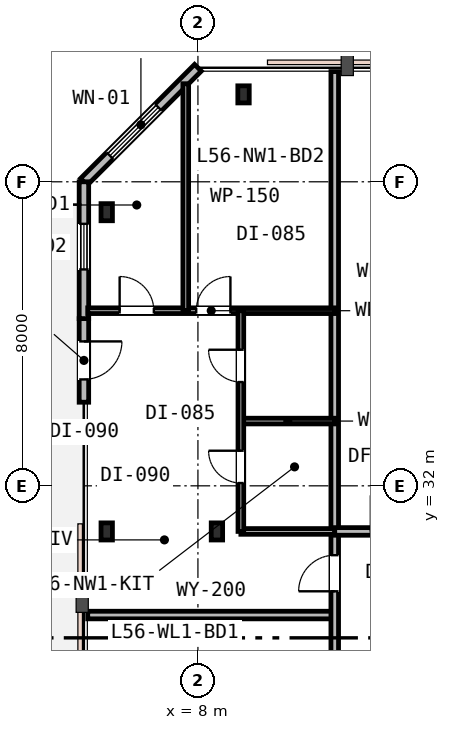
"""IFC4 building model, lengths in metres.
Left out: names, types, materials, properties, quantities, classifications, styles, units other than length and angle.
Written with IfcOpenShell. Run it as: python <this file> out.ifc"""

import sys

from ifc_helpers import new_model, si_unit, direction, frame, frame_2d, origin, origin_2d, place, context, subcontext, project, spatial, rectangle, i_section, extrude, element, fill, save


model = new_model("IFC4")
c1 = context("Model", 3, precision=1e-05, world=origin(), true_north=direction((0.0, 1.0)))
c2 = subcontext(c1, "Body", "Model", "MODEL_VIEW")
j1 = project(units=[si_unit("LENGTHUNIT", "METRE"), si_unit("PLANEANGLEUNIT", "RADIAN")], contexts=[c1])
p1 = place(None, origin())
s1 = spatial("IfcSite", under=j1, at=p1, CompositionType="ELEMENT")
p2 = place(p1, origin())
s2 = spatial("IfcBuilding", under=s1, at=p2, CompositionType="ELEMENT")
p3 = place(p2, frame((0.0, 0.0, 218.4)))
s3 = spatial("IfcBuildingStorey", under=s2, at=p3, CompositionType="ELEMENT", Elevation=218.4)
for number, where, z_axis, x_axis in (
    (1, (5.6, 30.8, 0.0), (0.0, 0.0, 1.0), (1.0, 0.0, 0.0)),
    (2, (5.6, 39.2, 0.0), (0.0, 0.0, 1.0), (1.0, 0.0, 0.0)),
    (3, (8.5, 30.8, 0.0), (0.0, 0.0, 1.0), (1.0, 0.0, 0.0)),
    (4, (9.2, 42.3, 0.0), (0.0, 0.0, 1.0), (1.0, 0.0, 0.0)),
):
    element("IfcColumn", number, at=place(p3, frame(where, z_axis=z_axis, x_axis=x_axis)), inside=s3, PredefinedType="COLUMN", context=c2, shape_type="SweptSolid", body=[
        extrude(i_section(OverallWidth=0.3, OverallDepth=0.45, WebThickness=0.014, FlangeThickness=0.026, FilletRadius=0.027, at=origin_2d()), origin(), (0.0, 0.0, 1.0), 3.8),
    ])
p4 = place(p3, frame((8.0, 43.0, 0.0), z_axis=(0.0, 0.0, 1.0), x_axis=(-0.707106781187, -0.707106781187, 0.0)))
e5 = element("IfcWall", 5, at=p4, inside=s3, PredefinedType="STANDARD", context=c2, shape_type="SweptSolid", body=[
    extrude(rectangle(XDim=4.243, YDim=0.25, at=frame_2d((2.121, 0.0))), origin(), (0.0, 0.0, 1.0), 3.53),
])
p5 = place(p4, frame((1.473, 0.0, 0.75)))
e6 = element("IfcOpeningElement", 6, at=p5, cuts=e5, PredefinedType="OPENING", context=c2, shape_type="SweptSolid", body=[
    extrude(rectangle(XDim=1.8, YDim=1.85, at=frame_2d((0.9, 0.925))), frame((0.0, 0.135, 0.0), z_axis=(0.0, -1.0, 0.0), x_axis=(1.0, 0.0, 0.0)), (0.0, 0.0, 1.0), 0.27),
])
p6 = place(p3, frame((5.0, 36.4, 0.0), z_axis=(0.0, 0.0, 1.0), x_axis=(0.0, -1.0, 0.0)))
e7 = element("IfcWall", 7, at=p6, inside=s3, PredefinedType="STANDARD", context=c2, shape_type="SweptSolid", body=[
    extrude(rectangle(XDim=2.2, YDim=0.25, at=frame_2d((1.1, 0.0))), origin(), (0.0, 0.0, 1.0), 3.53),
])
p7 = place(p6, frame((0.6, 0.0, 0.0)))
e8 = element("IfcOpeningElement", 8, at=p7, cuts=e7, PredefinedType="OPENING", context=c2, shape_type="SweptSolid", body=[
    extrude(rectangle(XDim=1.0, YDim=2.15, at=frame_2d((0.5, 1.075))), frame((0.0, 0.135, 0.0), z_axis=(0.0, -1.0, 0.0), x_axis=(1.0, 0.0, 0.0)), (0.0, 0.0, 1.0), 0.27),
])
p8 = place(p3, frame((5.0, 40.0, 0.0), z_axis=(0.0, 0.0, 1.0), x_axis=(0.0, -1.0, 0.0)))
e9 = element("IfcWall", 9, at=p8, inside=s3, PredefinedType="STANDARD", context=c2, shape_type="SweptSolid", body=[
    extrude(rectangle(XDim=3.6, YDim=0.25, at=frame_2d((1.8, 0.0))), origin(), (0.0, 0.0, 1.0), 3.53),
])
p9 = place(p8, frame((1.106, 0.0, 0.85)))
e10 = element("IfcOpeningElement", 10, at=p9, cuts=e9, PredefinedType="OPENING", context=c2, shape_type="SweptSolid", body=[
    extrude(rectangle(XDim=1.2, YDim=1.6, at=frame_2d((0.6, 0.8))), frame((0.0, 0.135, 0.0), z_axis=(0.0, -1.0, 0.0), x_axis=(1.0, 0.0, 0.0)), (0.0, 0.0, 1.0), 0.27),
])
p10 = place(p3, frame((5.1, 28.6, 0.0), z_axis=(0.0, 0.0, 1.0), x_axis=(1.0, 0.0, 0.0)))
e11 = element("IfcWall", 11, at=p10, inside=s3, PredefinedType="PARTITIONING", context=c2, shape_type="SweptSolid", body=[
    extrude(rectangle(XDim=6.5, YDim=0.2, at=frame_2d((3.25, 0.0))), origin(), (0.0, 0.0, 1.0), 2.92),
])
p11 = place(p3, frame((11.6, 17.0, 0.0), z_axis=(0.0, 0.0, 1.0), x_axis=(0.0, 1.0, 0.0)))
e12 = element("IfcWall", 12, at=p11, inside=s3, PredefinedType="PARTITIONING", context=c2, shape_type="SweptSolid", body=[
    extrude(rectangle(XDim=25.9, YDim=0.2, at=frame_2d((12.95, 0.0))), origin(), (0.0, 0.0, 1.0), 2.92),
])
p12 = place(p11, frame((12.225, 0.0, 0.0)))
e13 = element("IfcOpeningElement", 13, at=p12, cuts=e12, PredefinedType="OPENING", context=c2, shape_type="SweptSolid", body=[
    extrude(rectangle(XDim=0.95, YDim=2.15, at=frame_2d((0.475, 1.075))), frame((0.0, 0.11, 0.0), z_axis=(0.0, -1.0, 0.0), x_axis=(1.0, 0.0, 0.0)), (0.0, 0.0, 1.0), 0.22),
])
p13 = place(p11, frame((0.723, 0.0, 0.0)))
e14 = element("IfcOpeningElement", 14, at=p13, cuts=e12, PredefinedType="OPENING", context=c2, shape_type="SweptSolid", body=[
    extrude(rectangle(XDim=0.95, YDim=2.15, at=frame_2d((0.475, 1.075))), frame((0.0, 0.11, 0.0), z_axis=(0.0, -1.0, 0.0), x_axis=(1.0, 0.0, 0.0)), (0.0, 0.0, 1.0), 0.22),
])
p14 = place(p3, frame((9.13, 30.8, 0.0), z_axis=(0.0, 0.0, 1.0), x_axis=(1.0, 0.0, 0.0)))
e15 = element("IfcWall", 15, at=p14, inside=s3, PredefinedType="PARTITIONING", context=c2, shape_type="SweptSolid", body=[
    extrude(rectangle(XDim=2.47, YDim=0.15, at=frame_2d((1.235, 0.0))), origin(), (0.0, 0.0, 1.0), 2.92),
])
p15 = place(p3, frame((9.13, 33.704, 0.0), z_axis=(0.0, 0.0, 1.0), x_axis=(1.0, 0.0, 0.0)))
e16 = element("IfcWall", 16, at=p15, inside=s3, PredefinedType="PARTITIONING", context=c2, shape_type="SweptSolid", body=[
    extrude(rectangle(XDim=2.47, YDim=0.15, at=frame_2d((1.235, 0.0))), origin(), (0.0, 0.0, 1.0), 3.53),
])
p16 = place(p3, frame((5.1, 36.608, 0.0), z_axis=(0.0, 0.0, 1.0), x_axis=(1.0, 0.0, 0.0)))
e17 = element("IfcWall", 17, at=p16, inside=s3, PredefinedType="PARTITIONING", context=c2, shape_type="SweptSolid", body=[
    extrude(rectangle(XDim=6.5, YDim=0.15, at=frame_2d((3.25, 0.0))), origin(), (0.0, 0.0, 1.0), 3.24),
])
p17 = place(p16, frame((0.84, 0.0, 0.0)))
e18 = element("IfcOpeningElement", 18, at=p17, cuts=e17, PredefinedType="OPENING", context=c2, shape_type="SweptSolid", body=[
    extrude(rectangle(XDim=0.9, YDim=2.15, at=frame_2d((0.45, 1.075))), frame((0.0, 0.085, 0.0), z_axis=(0.0, -1.0, 0.0), x_axis=(1.0, 0.0, 0.0)), (0.0, 0.0, 1.0), 0.17),
])
p18 = place(p16, frame((2.855, 0.0, 0.0)))
e19 = element("IfcOpeningElement", 19, at=p18, cuts=e17, PredefinedType="OPENING", context=c2, shape_type="SweptSolid", body=[
    extrude(rectangle(XDim=0.9, YDim=2.15, at=frame_2d((0.45, 1.075))), frame((0.0, 0.085, 0.0), z_axis=(0.0, -1.0, 0.0), x_axis=(1.0, 0.0, 0.0)), (0.0, 0.0, 1.0), 0.17),
])
p19 = place(p3, frame((9.13, 30.8, 0.0), z_axis=(0.0, 0.0, 1.0), x_axis=(0.0, 1.0, 0.0)))
e20 = element("IfcWall", 20, at=p19, inside=s3, PredefinedType="PARTITIONING", context=c2, shape_type="SweptSolid", body=[
    extrude(rectangle(XDim=5.808, YDim=0.15, at=frame_2d((2.904, 0.0))), origin(), (0.0, 0.0, 1.0), 2.92),
])
p20 = place(p19, frame((1.274, 0.0, 0.0)))
e21 = element("IfcOpeningElement", 21, at=p20, cuts=e20, PredefinedType="OPENING", context=c2, shape_type="SweptSolid", body=[
    extrude(rectangle(XDim=0.85, YDim=2.15, at=frame_2d((0.425, 1.075))), frame((0.0, 0.085, 0.0), z_axis=(0.0, -1.0, 0.0), x_axis=(1.0, 0.0, 0.0)), (0.0, 0.0, 1.0), 0.17),
])
p21 = place(p19, frame((3.931, 0.0, 0.0)))
e22 = element("IfcOpeningElement", 22, at=p21, cuts=e20, PredefinedType="OPENING", context=c2, shape_type="SweptSolid", body=[
    extrude(rectangle(XDim=0.85, YDim=2.15, at=frame_2d((0.425, 1.075))), frame((0.0, 0.085, 0.0), z_axis=(0.0, -1.0, 0.0), x_axis=(1.0, 0.0, 0.0)), (0.0, 0.0, 1.0), 0.17),
])
p22 = place(p3, frame((7.68, 36.608, 0.0), z_axis=(0.0, 0.0, 1.0), x_axis=(0.0, 1.0, 0.0)))
e23 = element("IfcWall", 23, at=p22, inside=s3, PredefinedType="PARTITIONING", context=c2, shape_type="SweptSolid", body=[
    extrude(rectangle(XDim=5.972, YDim=0.15, at=frame_2d((2.986, 0.0))), origin(), (0.0, 0.0, 1.0), 3.24),
])
p23 = place(p3, frame((11.6, 30.8, 0.0), z_axis=(0.0, 0.0, 1.0), x_axis=(1.0, 0.0, 0.0)))
e24 = element("IfcWall", 24, at=p23, inside=s3, PredefinedType="PARTITIONING", context=c2, shape_type="SweptSolid", body=[
    extrude(rectangle(XDim=2.85, YDim=0.2, at=frame_2d((1.425, 0.0))), origin(), (0.0, 0.0, 1.0), 2.92),
])
p24 = place(p23, frame((0.95, 0.0, 0.0)))
e25 = element("IfcOpeningElement", 25, at=p24, cuts=e24, PredefinedType="OPENING", context=c2, shape_type="SweptSolid", body=[
    extrude(rectangle(XDim=0.95, YDim=2.15, at=frame_2d((0.475, 1.075))), frame((0.0, 0.11, 0.0), z_axis=(0.0, -1.0, 0.0), x_axis=(1.0, 0.0, 0.0)), (0.0, 0.0, 1.0), 0.22),
])
p25 = place(p5, origin())
e26 = element("IfcWindow", 26, at=p25, inside=s3, PartitioningType="SINGLE_PANEL", PredefinedType="WINDOW", context=c2, shape_type="SweptSolid", body=[
    extrude(rectangle(XDim=1.8, YDim=1.85, at=frame_2d((0.9, 0.925))), frame((0.0, 0.03, 0.0), z_axis=(0.0, -1.0, 0.0), x_axis=(1.0, 0.0, 0.0)), (0.0, 0.0, 1.0), 0.06),
])
fill(e6, e26)
p26 = place(p7, origin())
e27 = element("IfcDoor", 27, at=p26, inside=s3, OperationType="SINGLE_SWING_LEFT", PredefinedType="DOOR", context=c2, shape_type="SweptSolid", body=[
    extrude(rectangle(XDim=1.0, YDim=2.15, at=frame_2d((0.5, 1.075))), frame((0.0, 0.025, 0.0), z_axis=(0.0, -1.0, 0.0), x_axis=(1.0, 0.0, 0.0)), (0.0, 0.0, 1.0), 0.05),
])
fill(e8, e27)
p27 = place(p9, origin())
e28 = element("IfcWindow", 28, at=p27, inside=s3, PartitioningType="SINGLE_PANEL", PredefinedType="WINDOW", context=c2, shape_type="SweptSolid", body=[
    extrude(rectangle(XDim=1.2, YDim=1.6, at=frame_2d((0.6, 0.8))), frame((0.0, 0.03, 0.0), z_axis=(0.0, -1.0, 0.0), x_axis=(1.0, 0.0, 0.0)), (0.0, 0.0, 1.0), 0.06),
])
fill(e10, e28)
p28 = place(p12, origin())
e29 = element("IfcDoor", 29, at=p28, inside=s3, OperationType="SINGLE_SWING_LEFT", PredefinedType="DOOR", context=c2, shape_type="SweptSolid", body=[
    extrude(rectangle(XDim=0.95, YDim=2.15, at=frame_2d((0.475, 1.075))), frame((0.0, 0.025, 0.0), z_axis=(0.0, -1.0, 0.0), x_axis=(1.0, 0.0, 0.0)), (0.0, 0.0, 1.0), 0.05),
])
fill(e13, e29)
p29 = place(p20, origin())
e30 = element("IfcDoor", 30, at=p29, inside=s3, OperationType="SINGLE_SWING_RIGHT", PredefinedType="DOOR", context=c2, shape_type="SweptSolid", body=[
    extrude(rectangle(XDim=0.85, YDim=2.15, at=frame_2d((0.425, 1.075))), frame((0.0, 0.025, 0.0), z_axis=(0.0, -1.0, 0.0), x_axis=(1.0, 0.0, 0.0)), (0.0, 0.0, 1.0), 0.05),
])
fill(e21, e30)
p30 = place(p21, origin())
e31 = element("IfcDoor", 31, at=p30, inside=s3, OperationType="SINGLE_SWING_RIGHT", PredefinedType="DOOR", context=c2, shape_type="SweptSolid", body=[
    extrude(rectangle(XDim=0.85, YDim=2.15, at=frame_2d((0.425, 1.075))), frame((0.0, 0.025, 0.0), z_axis=(0.0, -1.0, 0.0), x_axis=(1.0, 0.0, 0.0)), (0.0, 0.0, 1.0), 0.05),
])
fill(e22, e31)
p31 = place(p17, origin())
e32 = element("IfcDoor", 32, at=p31, inside=s3, OperationType="SINGLE_SWING_LEFT", PredefinedType="DOOR", context=c2, shape_type="SweptSolid", body=[
    extrude(rectangle(XDim=0.9, YDim=2.15, at=frame_2d((0.45, 1.075))), frame((0.0, 0.025, 0.0), z_axis=(0.0, -1.0, 0.0), x_axis=(1.0, 0.0, 0.0)), (0.0, 0.0, 1.0), 0.05),
])
fill(e18, e32)
p32 = place(p18, origin())
e33 = element("IfcDoor", 33, at=p32, inside=s3, OperationType="SINGLE_SWING_RIGHT", PredefinedType="DOOR", context=c2, shape_type="SweptSolid", body=[
    extrude(rectangle(XDim=0.9, YDim=2.15, at=frame_2d((0.45, 1.075))), frame((0.0, 0.025, 0.0), z_axis=(0.0, -1.0, 0.0), x_axis=(1.0, 0.0, 0.0)), (0.0, 0.0, 1.0), 0.05),
])
fill(e19, e33)
save(model, sys.argv[1])
